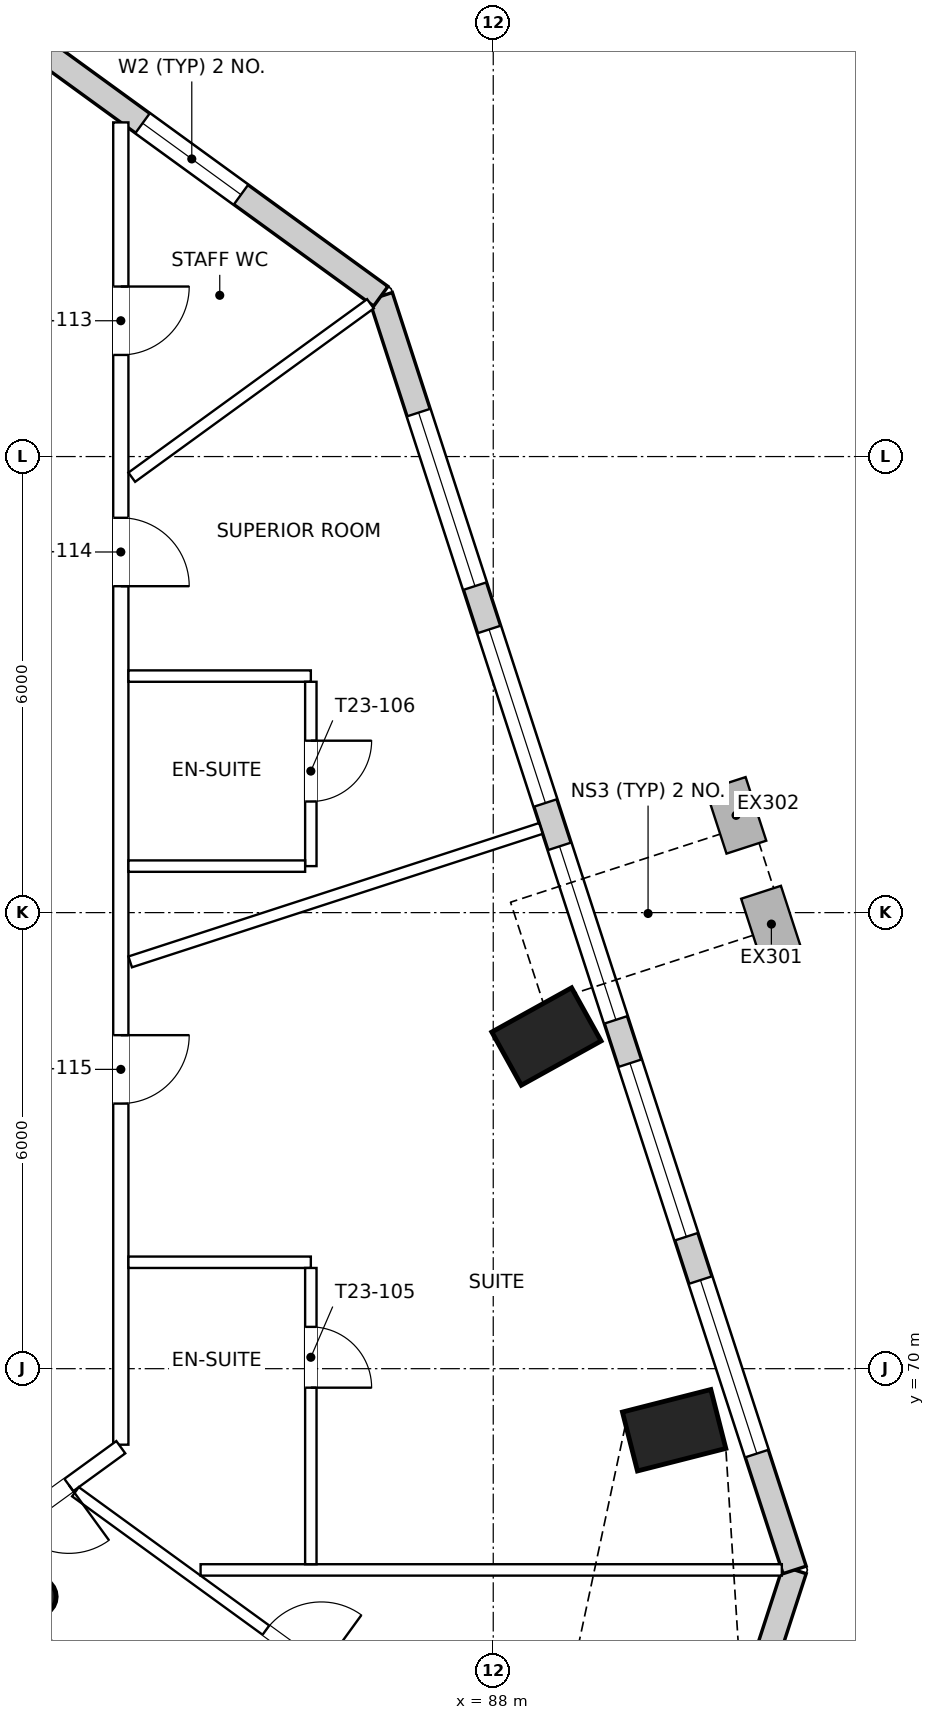
"""IFC4 building model, lengths in metres.
Left out: names, types, materials, properties, quantities, classifications, styles, units other than length and angle.
Written with IfcOpenShell. Run it as: python <this file> out.ifc"""

import sys

from ifc_helpers import new_model, si_unit, direction, frame, frame_2d, origin, origin_2d, place, context, subcontext, project, spatial, rectangle, circle, extrude, element, fill, save


model = new_model("IFC4")
c1 = context("Model", 3, precision=1e-05, world=origin(), true_north=direction((0.0, 1.0)))
c2 = subcontext(c1, "Body", "Model", "MODEL_VIEW")
j1 = project(units=[si_unit("LENGTHUNIT", "METRE"), si_unit("PLANEANGLEUNIT", "RADIAN")], contexts=[c1])
p1 = place(None, origin())
s1 = spatial("IfcSite", under=j1, at=p1, CompositionType="ELEMENT")
p2 = place(p1, origin())
s2 = spatial("IfcBuilding", under=s1, at=p2, CompositionType="ELEMENT")
p3 = place(p2, frame((0.0, 0.0, 317.8)))
s3 = spatial("IfcBuildingStorey", under=s2, at=p3, CompositionType="ELEMENT", Elevation=317.8)
for number, where, z_axis, x_axis in (
    (1, (90.38, 69.19, 0.0), (0.0, 0.0, 1.0), (0.247, -0.969, 0.0)),
    (2, (88.7, 74.37, 0.0), (0.0, 0.0, 1.0), (0.485, -0.875, 0.0)),
):
    element("IfcColumn", number, at=place(p3, frame(where, z_axis=z_axis, x_axis=x_axis)), inside=s3, PredefinedType="COLUMN", context=c2, shape_type="SweptSolid", body=[
        extrude(rectangle(XDim=0.8, YDim=1.2, at=origin_2d()), origin(), (0.0, 0.0, 1.0), 3.9),
    ])
p4 = place(p3, frame((82.0, 67.0, 0.0), z_axis=(0.0, 0.0, 1.0), x_axis=(1.0, 0.0, 0.0)))
e3 = element("IfcColumn", 3, at=p4, inside=s3, PredefinedType="COLUMN", context=c2, shape_type="SweptSolid", body=[
    extrude(circle(Radius=0.25, at=origin_2d()), origin(), (0.0, 0.0, 1.0), 3.9),
])
p5 = place(p3, frame((90.428, 62.623, 0.0), z_axis=(0.0, 0.0, 1.0), x_axis=(0.309016131261, 0.951056796737, 0.0)))
e4 = element("IfcWall", 4, at=p5, inside=s3, PredefinedType="SOLIDWALL", context=c2, shape_type="SweptSolid", body=[
    extrude(rectangle(XDim=4.973, YDim=0.32, at=frame_2d((2.486, 0.0))), origin(), (0.0, 0.0, 1.0), 3.5),
])
p6 = place(p3, frame((91.965, 67.352, 0.0), z_axis=(0.0, 0.0, 1.0), x_axis=(-0.309018707068, 0.951055959806, 0.0)))
e5 = element("IfcWall", 5, at=p6, inside=s3, PredefinedType="SOLIDWALL", context=c2, shape_type="SweptSolid", body=[
    extrude(rectangle(XDim=17.619, YDim=0.32, at=frame_2d((8.81, 0.0))), origin(), (0.0, 0.0, 1.0), 3.5),
])
p7 = place(p6, frame((1.609, 0.0, 0.55)))
e6 = element("IfcOpeningElement", 6, at=p7, cuts=e5, PredefinedType="OPENING", context=c2, shape_type="SweptSolid", body=[
    extrude(rectangle(XDim=2.4, YDim=2.3, at=frame_2d((1.2, 1.15))), frame((0.0, 0.17, 0.0), z_axis=(0.0, -1.0, 0.0), x_axis=(1.0, 0.0, 0.0)), (0.0, 0.0, 1.0), 0.34),
])
p8 = place(p6, frame((4.609, 0.0, 0.55)))
e7 = element("IfcOpeningElement", 7, at=p8, cuts=e5, PredefinedType="OPENING", context=c2, shape_type="SweptSolid", body=[
    extrude(rectangle(XDim=2.4, YDim=2.3, at=frame_2d((1.2, 1.15))), frame((0.0, 0.17, 0.0), z_axis=(0.0, -1.0, 0.0), x_axis=(1.0, 0.0, 0.0)), (0.0, 0.0, 1.0), 0.34),
])
p9 = place(p6, frame((7.609, 0.0, 0.55)))
e8 = element("IfcOpeningElement", 8, at=p9, cuts=e5, PredefinedType="OPENING", context=c2, shape_type="SweptSolid", body=[
    extrude(rectangle(XDim=2.4, YDim=2.3, at=frame_2d((1.2, 1.15))), frame((0.0, 0.17, 0.0), z_axis=(0.0, -1.0, 0.0), x_axis=(1.0, 0.0, 0.0)), (0.0, 0.0, 1.0), 0.34),
])
p10 = place(p6, frame((10.609, 0.0, 0.55)))
e9 = element("IfcOpeningElement", 9, at=p10, cuts=e5, PredefinedType="OPENING", context=c2, shape_type="SweptSolid", body=[
    extrude(rectangle(XDim=2.4, YDim=2.3, at=frame_2d((1.2, 1.15))), frame((0.0, 0.17, 0.0), z_axis=(0.0, -1.0, 0.0), x_axis=(1.0, 0.0, 0.0)), (0.0, 0.0, 1.0), 0.34),
])
p11 = place(p6, frame((13.609, 0.0, 0.55)))
e10 = element("IfcOpeningElement", 10, at=p11, cuts=e5, PredefinedType="OPENING", context=c2, shape_type="SweptSolid", body=[
    extrude(rectangle(XDim=2.4, YDim=2.3, at=frame_2d((1.2, 1.15))), frame((0.0, 0.17, 0.0), z_axis=(0.0, -1.0, 0.0), x_axis=(1.0, 0.0, 0.0)), (0.0, 0.0, 1.0), 0.34),
])
p12 = place(p3, frame((86.521, 84.109, 0.0), z_axis=(0.0, 0.0, 1.0), x_axis=(-0.809013740323, 0.587789731084, 0.0)))
e11 = element("IfcWall", 11, at=p12, inside=s3, PredefinedType="SOLIDWALL", context=c2, shape_type="SweptSolid", body=[
    extrude(rectangle(XDim=6.348, YDim=0.32, at=frame_2d((3.174, 0.0))), origin(), (0.0, 0.0, 1.0), 3.5),
])
p13 = place(p12, frame((2.274, 0.0, 0.9)))
e12 = element("IfcOpeningElement", 12, at=p13, cuts=e11, PredefinedType="OPENING", context=c2, shape_type="SweptSolid", body=[
    extrude(rectangle(XDim=1.6, YDim=1.8, at=frame_2d((0.8, 0.9))), frame((0.0, 0.17, 0.0), z_axis=(0.0, -1.0, 0.0), x_axis=(1.0, 0.0, 0.0)), (0.0, 0.0, 1.0), 0.34),
])
p14 = place(p3, frame((83.1, 86.396, 0.0), z_axis=(0.0, 0.0, 1.0), x_axis=(0.0, -1.0, 0.0)))
e13 = element("IfcWall", 13, at=p14, inside=s3, PredefinedType="PARTITIONING", context=c2, shape_type="SweptSolid", body=[
    extrude(rectangle(XDim=17.396, YDim=0.2, at=frame_2d((8.698, 0.0))), origin(), (0.0, 0.0, 1.0), 3.05),
])
p15 = place(p14, frame((2.159, 0.0, 0.0)))
e14 = element("IfcOpeningElement", 14, at=p15, cuts=e13, PredefinedType="OPENING", context=c2, shape_type="SweptSolid", body=[
    extrude(rectangle(XDim=0.9, YDim=2.1, at=frame_2d((0.45, 1.05))), frame((0.0, 0.11, 0.0), z_axis=(0.0, -1.0, 0.0), x_axis=(1.0, 0.0, 0.0)), (0.0, 0.0, 1.0), 0.22),
])
p16 = place(p14, frame((5.202, 0.0, 0.0)))
e15 = element("IfcOpeningElement", 15, at=p16, cuts=e13, PredefinedType="OPENING", context=c2, shape_type="SweptSolid", body=[
    extrude(rectangle(XDim=0.9, YDim=2.1, at=frame_2d((0.45, 1.05))), frame((0.0, 0.11, 0.0), z_axis=(0.0, -1.0, 0.0), x_axis=(1.0, 0.0, 0.0)), (0.0, 0.0, 1.0), 0.22),
])
p17 = place(p14, frame((12.009, 0.0, 0.0)))
e16 = element("IfcOpeningElement", 16, at=p17, cuts=e13, PredefinedType="OPENING", context=c2, shape_type="SweptSolid", body=[
    extrude(rectangle(XDim=0.9, YDim=2.1, at=frame_2d((0.45, 1.05))), frame((0.0, 0.11, 0.0), z_axis=(0.0, -1.0, 0.0), x_axis=(1.0, 0.0, 0.0)), (0.0, 0.0, 1.0), 0.22),
])
p18 = place(p3, frame((83.1, 68.967, 0.0), z_axis=(0.0, 0.0, 1.0), x_axis=(-0.809024626779, -0.587774747046, 0.0)))
e17 = element("IfcWall", 17, at=p18, inside=s3, PredefinedType="PARTITIONING", context=c2, shape_type="SweptSolid", body=[
    extrude(rectangle(XDim=8.705, YDim=0.2, at=frame_2d((4.353, 0.0))), origin(), (0.0, 0.0, 1.0), 3.5),
])
p19 = place(p18, frame((0.845, 0.0, 0.0)))
e18 = element("IfcOpeningElement", 18, at=p19, cuts=e17, PredefinedType="OPENING", context=c2, shape_type="SweptSolid", body=[
    extrude(rectangle(XDim=0.9, YDim=2.1, at=frame_2d((0.45, 1.05))), frame((0.0, 0.11, 0.0), z_axis=(0.0, -1.0, 0.0), x_axis=(1.0, 0.0, 0.0)), (0.0, 0.0, 1.0), 0.22),
])
p20 = place(p18, frame((5.026, 0.0, 0.0)))
e19 = element("IfcOpeningElement", 19, at=p20, cuts=e17, PredefinedType="OPENING", context=c2, shape_type="SweptSolid", body=[
    extrude(rectangle(XDim=0.9, YDim=2.1, at=frame_2d((0.45, 1.05))), frame((0.0, 0.11, 0.0), z_axis=(0.0, -1.0, 0.0), x_axis=(1.0, 0.0, 0.0)), (0.0, 0.0, 1.0), 0.22),
])
p21 = place(p3, frame((88.243, 64.211, 0.0), z_axis=(0.0, 0.0, 1.0), x_axis=(-0.809012762511, 0.587791076909, 0.0)))
e20 = element("IfcWall", 20, at=p21, inside=s3, PredefinedType="PARTITIONING", context=c2, shape_type="SweptSolid", body=[
    extrude(rectangle(XDim=7.095, YDim=0.15, at=frame_2d((3.547, 0.0))), origin(), (0.0, 0.0, 1.0), 3.05),
])
p22 = place(p21, frame((3.097, 0.0, 0.0)))
e21 = element("IfcOpeningElement", 21, at=p22, cuts=e20, PredefinedType="OPENING", context=c2, shape_type="SweptSolid", body=[
    extrude(rectangle(XDim=0.9, YDim=2.1, at=frame_2d((0.45, 1.05))), frame((0.0, 0.085, 0.0), z_axis=(0.0, -1.0, 0.0), x_axis=(1.0, 0.0, 0.0)), (0.0, 0.0, 1.0), 0.17),
])
p23 = place(p3, frame((91.797, 67.352, 0.0), z_axis=(0.0, 0.0, 1.0), x_axis=(-1.0, 0.0, 0.0)))
e22 = element("IfcWall", 22, at=p23, inside=s3, PredefinedType="PARTITIONING", context=c2, shape_type="SweptSolid", body=[
    extrude(rectangle(XDim=7.647, YDim=0.15, at=frame_2d((3.824, 0.0))), origin(), (0.0, 0.0, 1.0), 3.05),
])
p24 = place(p3, frame((86.385, 84.01, 0.0), z_axis=(0.0, 0.0, 1.0), x_axis=(-0.809002534855, -0.5878051536, 0.0)))
e23 = element("IfcWall", 23, at=p24, inside=s3, PredefinedType="PARTITIONING", context=c2, shape_type="SweptSolid", body=[
    extrude(rectangle(XDim=3.882, YDim=0.15, at=frame_2d((1.941, 0.0))), origin(), (0.0, 0.0, 1.0), 3.5),
])
p25 = place(p3, frame((83.715, 64.194, 0.0), z_axis=(0.0, 0.0, 1.0), x_axis=(-0.587756163253, 0.809038128, 0.0)))
e24 = element("IfcWall", 24, at=p25, inside=s3, PredefinedType="PARTITIONING", context=c2, shape_type="SweptSolid", body=[
    extrude(rectangle(XDim=4.123, YDim=0.15, at=frame_2d((2.062, 0.0))), origin(), (0.0, 0.0, 1.0), 3.5),
])
p26 = place(p3, frame((88.627, 77.108, 0.0), z_axis=(0.0, 0.0, 1.0), x_axis=(-0.951057747163, -0.309013206126, 0.0)))
e25 = element("IfcWall", 25, at=p26, inside=s3, PredefinedType="PARTITIONING", context=c2, shape_type="SweptSolid", body=[
    extrude(rectangle(XDim=5.682, YDim=0.15, at=frame_2d((2.841, 0.0))), origin(), (0.0, 0.0, 1.0), 3.5),
])
p27 = place(p3, frame((83.2, 71.4, 0.0), z_axis=(0.0, 0.0, 1.0), x_axis=(1.0, 0.0, 0.0)))
e26 = element("IfcWall", 26, at=p27, inside=s3, PredefinedType="PARTITIONING", context=c2, shape_type="SweptSolid", body=[
    extrude(rectangle(XDim=2.4, YDim=0.15, at=frame_2d((1.2, 0.0))), origin(), (0.0, 0.0, 1.0), 3.5),
])
p28 = place(p3, frame((85.6, 67.427, 0.0), z_axis=(0.0, 0.0, 1.0), x_axis=(0.0, 1.0, 0.0)))
e27 = element("IfcWall", 27, at=p28, inside=s3, PredefinedType="PARTITIONING", context=c2, shape_type="SweptSolid", body=[
    extrude(rectangle(XDim=3.897, YDim=0.15, at=frame_2d((1.949, 0.0))), origin(), (0.0, 0.0, 1.0), 3.5),
])
p29 = place(p28, frame((2.323, 0.0, 0.0)))
e28 = element("IfcOpeningElement", 28, at=p29, cuts=e27, PredefinedType="OPENING", context=c2, shape_type="SweptSolid", body=[
    extrude(rectangle(XDim=0.8, YDim=2.1, at=frame_2d((0.4, 1.05))), frame((0.0, 0.085, 0.0), z_axis=(0.0, -1.0, 0.0), x_axis=(1.0, 0.0, 0.0)), (0.0, 0.0, 1.0), 0.17),
])
p30 = place(p3, frame((83.2, 79.112, 0.0), z_axis=(0.0, 0.0, 1.0), x_axis=(1.0, 0.0, 0.0)))
e29 = element("IfcWall", 29, at=p30, inside=s3, PredefinedType="PARTITIONING", context=c2, shape_type="SweptSolid", body=[
    extrude(rectangle(XDim=2.4, YDim=0.15, at=frame_2d((1.2, 0.0))), origin(), (0.0, 0.0, 1.0), 3.5),
])
p31 = place(p3, frame((85.6, 76.612, 0.0), z_axis=(0.0, 0.0, 1.0), x_axis=(0.0, 1.0, 0.0)))
e30 = element("IfcWall", 30, at=p31, inside=s3, PredefinedType="PARTITIONING", context=c2, shape_type="SweptSolid", body=[
    extrude(rectangle(XDim=2.425, YDim=0.15, at=frame_2d((1.212, 0.0))), origin(), (0.0, 0.0, 1.0), 3.5),
])
p32 = place(p31, frame((0.85, 0.0, 0.0)))
e31 = element("IfcOpeningElement", 31, at=p32, cuts=e30, PredefinedType="OPENING", context=c2, shape_type="SweptSolid", body=[
    extrude(rectangle(XDim=0.8, YDim=2.1, at=frame_2d((0.4, 1.05))), frame((0.0, 0.085, 0.0), z_axis=(0.0, -1.0, 0.0), x_axis=(1.0, 0.0, 0.0)), (0.0, 0.0, 1.0), 0.17),
])
p33 = place(p3, frame((83.2, 76.612, 0.0), z_axis=(0.0, 0.0, 1.0), x_axis=(1.0, 0.0, 0.0)))
e32 = element("IfcWall", 32, at=p33, inside=s3, PredefinedType="PARTITIONING", context=c2, shape_type="SweptSolid", body=[
    extrude(rectangle(XDim=2.325, YDim=0.15, at=frame_2d((1.163, 0.0))), origin(), (0.0, 0.0, 1.0), 3.5),
])
p34 = place(p7, origin())
e33 = element("IfcWindow", 33, at=p34, inside=s3, PartitioningType="SINGLE_PANEL", PredefinedType="WINDOW", context=c2, shape_type="SweptSolid", body=[
    extrude(rectangle(XDim=2.4, YDim=2.3, at=frame_2d((1.2, 1.15))), frame((0.0, 0.07, 0.0), z_axis=(0.0, -1.0, 0.0), x_axis=(1.0, 0.0, 0.0)), (0.0, 0.0, 1.0), 0.06),
])
fill(e6, e33)
p35 = place(p8, origin())
e34 = element("IfcWindow", 34, at=p35, inside=s3, PartitioningType="SINGLE_PANEL", PredefinedType="WINDOW", context=c2, shape_type="SweptSolid", body=[
    extrude(rectangle(XDim=2.4, YDim=2.3, at=frame_2d((1.2, 1.15))), frame((0.0, 0.07, 0.0), z_axis=(0.0, -1.0, 0.0), x_axis=(1.0, 0.0, 0.0)), (0.0, 0.0, 1.0), 0.06),
])
fill(e7, e34)
p36 = place(p9, origin())
e35 = element("IfcWindow", 35, at=p36, inside=s3, PartitioningType="SINGLE_PANEL", PredefinedType="WINDOW", context=c2, shape_type="SweptSolid", body=[
    extrude(rectangle(XDim=2.4, YDim=2.3, at=frame_2d((1.2, 1.15))), frame((0.0, 0.07, 0.0), z_axis=(0.0, -1.0, 0.0), x_axis=(1.0, 0.0, 0.0)), (0.0, 0.0, 1.0), 0.06),
])
fill(e8, e35)
p37 = place(p10, origin())
e36 = element("IfcWindow", 36, at=p37, inside=s3, PartitioningType="SINGLE_PANEL", PredefinedType="WINDOW", context=c2, shape_type="SweptSolid", body=[
    extrude(rectangle(XDim=2.4, YDim=2.3, at=frame_2d((1.2, 1.15))), frame((0.0, 0.07, 0.0), z_axis=(0.0, -1.0, 0.0), x_axis=(1.0, 0.0, 0.0)), (0.0, 0.0, 1.0), 0.06),
])
fill(e9, e36)
p38 = place(p11, origin())
e37 = element("IfcWindow", 37, at=p38, inside=s3, PartitioningType="SINGLE_PANEL", PredefinedType="WINDOW", context=c2, shape_type="SweptSolid", body=[
    extrude(rectangle(XDim=2.4, YDim=2.3, at=frame_2d((1.2, 1.15))), frame((0.0, 0.07, 0.0), z_axis=(0.0, -1.0, 0.0), x_axis=(1.0, 0.0, 0.0)), (0.0, 0.0, 1.0), 0.06),
])
fill(e10, e37)
p39 = place(p13, origin())
e38 = element("IfcWindow", 38, at=p39, inside=s3, PartitioningType="SINGLE_PANEL", PredefinedType="WINDOW", context=c2, shape_type="SweptSolid", body=[
    extrude(rectangle(XDim=1.6, YDim=1.8, at=frame_2d((0.8, 0.9))), frame((0.0, 0.07, 0.0), z_axis=(0.0, -1.0, 0.0), x_axis=(1.0, 0.0, 0.0)), (0.0, 0.0, 1.0), 0.06),
])
fill(e12, e38)
p40 = place(p29, frame((0.8, 0.0, 0.0), z_axis=(0.0, 0.0, 1.0), x_axis=(-1.0, 0.0, 0.0)))
e39 = element("IfcDoor", 39, at=p40, inside=s3, OperationType="SINGLE_SWING_RIGHT", PredefinedType="DOOR", context=c2, shape_type="SweptSolid", body=[
    extrude(rectangle(XDim=0.8, YDim=2.1, at=frame_2d((0.4, 1.05))), frame((0.0, 0.025, 0.0), z_axis=(0.0, -1.0, 0.0), x_axis=(1.0, 0.0, 0.0)), (0.0, 0.0, 1.0), 0.05),
])
fill(e28, e39)
p41 = place(p32, frame((0.8, 0.0, 0.0), z_axis=(0.0, 0.0, 1.0), x_axis=(-1.0, 0.0, 0.0)))
e40 = element("IfcDoor", 40, at=p41, inside=s3, OperationType="SINGLE_SWING_LEFT", PredefinedType="DOOR", context=c2, shape_type="SweptSolid", body=[
    extrude(rectangle(XDim=0.8, YDim=2.1, at=frame_2d((0.4, 1.05))), frame((0.0, 0.025, 0.0), z_axis=(0.0, -1.0, 0.0), x_axis=(1.0, 0.0, 0.0)), (0.0, 0.0, 1.0), 0.05),
])
fill(e31, e40)
p42 = place(p15, origin())
e41 = element("IfcDoor", 41, at=p42, inside=s3, OperationType="SINGLE_SWING_LEFT", PredefinedType="DOOR", context=c2, shape_type="SweptSolid", body=[
    extrude(rectangle(XDim=0.9, YDim=2.1, at=frame_2d((0.45, 1.05))), frame((0.0, 0.025, 0.0), z_axis=(0.0, -1.0, 0.0), x_axis=(1.0, 0.0, 0.0)), (0.0, 0.0, 1.0), 0.05),
])
fill(e14, e41)
p43 = place(p16, origin())
e42 = element("IfcDoor", 42, at=p43, inside=s3, OperationType="SINGLE_SWING_RIGHT", PredefinedType="DOOR", context=c2, shape_type="SweptSolid", body=[
    extrude(rectangle(XDim=0.9, YDim=2.1, at=frame_2d((0.45, 1.05))), frame((0.0, 0.025, 0.0), z_axis=(0.0, -1.0, 0.0), x_axis=(1.0, 0.0, 0.0)), (0.0, 0.0, 1.0), 0.05),
])
fill(e15, e42)
p44 = place(p17, origin())
e43 = element("IfcDoor", 43, at=p44, inside=s3, OperationType="SINGLE_SWING_LEFT", PredefinedType="DOOR", context=c2, shape_type="SweptSolid", body=[
    extrude(rectangle(XDim=0.9, YDim=2.1, at=frame_2d((0.45, 1.05))), frame((0.0, 0.025, 0.0), z_axis=(0.0, -1.0, 0.0), x_axis=(1.0, 0.0, 0.0)), (0.0, 0.0, 1.0), 0.05),
])
fill(e16, e43)
p45 = place(p19, origin())
e44 = element("IfcDoor", 44, at=p45, inside=s3, OperationType="SINGLE_SWING_LEFT", PredefinedType="DOOR", context=c2, shape_type="SweptSolid", body=[
    extrude(rectangle(XDim=0.9, YDim=2.1, at=frame_2d((0.45, 1.05))), frame((0.0, 0.025, 0.0), z_axis=(0.0, -1.0, 0.0), x_axis=(1.0, 0.0, 0.0)), (0.0, 0.0, 1.0), 0.05),
])
fill(e18, e44)
p46 = place(p22, frame((0.9, 0.0, 0.0), z_axis=(0.0, 0.0, 1.0), x_axis=(-1.0, 0.0, 0.0)))
e45 = element("IfcDoor", 45, at=p46, inside=s3, OperationType="SINGLE_SWING_RIGHT", PredefinedType="DOOR", context=c2, shape_type="SweptSolid", body=[
    extrude(rectangle(XDim=0.9, YDim=2.1, at=frame_2d((0.45, 1.05))), frame((0.0, 0.025, 0.0), z_axis=(0.0, -1.0, 0.0), x_axis=(1.0, 0.0, 0.0)), (0.0, 0.0, 1.0), 0.05),
])
fill(e21, e45)
save(model, sys.argv[1])
